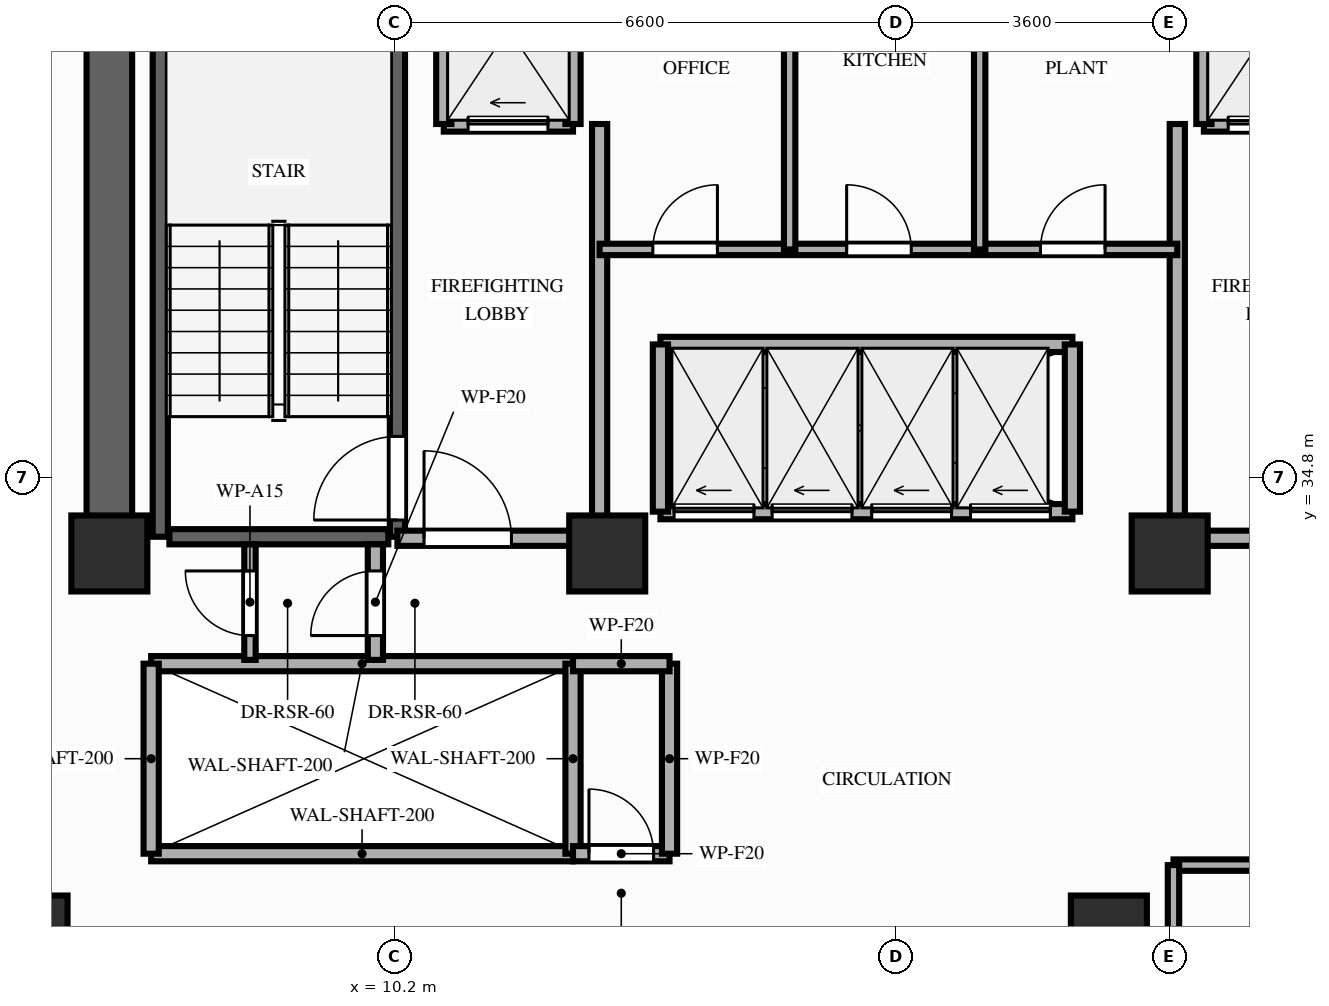
"""IFC4 building model, lengths in metres.
Left out: names, types, materials, properties, quantities, classifications, styles, units other than length and angle.
Written with IfcOpenShell. Run it as: python <this file> out.ifc"""

import sys

from ifc_helpers import new_model, si_unit, direction, frame, frame_2d, origin, origin_2d, place, context, subcontext, project, spatial, rectangle, extrude, element, fill, save


model = new_model("IFC4")
c1 = context("Model", 3, precision=1e-05, world=origin(), true_north=direction((0.0, 1.0)))
c2 = subcontext(c1, "Body", "Model", "MODEL_VIEW")
j1 = project(units=[si_unit("LENGTHUNIT", "METRE"), si_unit("PLANEANGLEUNIT", "RADIAN")], contexts=[c1])
p1 = place(None, origin())
s1 = spatial("IfcSite", under=j1, at=p1, CompositionType="ELEMENT")
p2 = place(p1, origin())
s2 = spatial("IfcBuilding", under=s1, at=p2, CompositionType="ELEMENT")
p3 = place(p2, frame((0.0, 0.0, 123.4)))
s3 = spatial("IfcBuildingStorey", under=s2, at=p3, CompositionType="ELEMENT", Elevation=123.4)
for number, where, z_axis, x_axis in (
    (1, (6.45, 33.8, 0.0), (0.0, 0.0, 1.0), (1.0, 0.0, 0.0)),
    (2, (13.0, 33.8, 0.0), (0.0, 0.0, 1.0), (1.0, 0.0, 0.0)),
    (3, (20.4, 33.8, 0.0), (0.0, 0.0, 1.0), (1.0, 0.0, 0.0)),
    (4, (5.4, 28.8, 0.0), (0.0, 0.0, 1.0), (1.0, 0.0, 0.0)),
    (5, (19.6, 28.8, 0.0), (0.0, 0.0, 1.0), (1.0, 0.0, 0.0)),
):
    element("IfcColumn", number, at=place(p3, frame(where, z_axis=z_axis, x_axis=x_axis)), inside=s3, PredefinedType="COLUMN", context=c2, shape_type="SweptSolid", body=[
        extrude(rectangle(XDim=1.0, YDim=1.0, at=origin_2d()), origin(), (0.0, 0.0, 1.0), 3.2),
    ])
p4 = place(p3, frame((6.45, 33.8, 0.0), z_axis=(0.0, 0.0, 1.0), x_axis=(0.0, 1.0, 0.0)))
e6 = element("IfcWall", 6, at=p4, inside=s3, PredefinedType="SHEAR", context=c2, shape_type="SweptSolid", body=[
    extrude(rectangle(XDim=7.95, YDim=0.6, at=frame_2d((3.975, 0.0))), origin(), (0.0, 0.0, 1.0), 3.02),
])
p5 = place(p3, frame((7.12, 34.02, 0.0), z_axis=(0.0, 0.0, 1.0), x_axis=(0.0, 1.0, 0.0)))
e7 = element("IfcWall", 7, at=p5, inside=s3, PredefinedType="SHEAR", context=c2, shape_type="SweptSolid", body=[
    extrude(rectangle(XDim=7.78, YDim=0.2, at=frame_2d((3.89, 0.0))), origin(), (0.0, 0.0, 1.0), 3.02),
])
p6 = place(p3, frame((10.24, 34.02, 0.0), z_axis=(0.0, 0.0, 1.0), x_axis=(0.0, 1.0, 0.0)))
e8 = element("IfcWall", 8, at=p6, inside=s3, PredefinedType="SHEAR", context=c2, shape_type="SweptSolid", body=[
    extrude(rectangle(XDim=7.78, YDim=0.2, at=frame_2d((3.89, 0.0))), origin(), (0.0, 0.0, 1.0), 3.02),
])
p7 = place(p6, frame((0.22, 0.0, 0.0)))
e9 = element("IfcOpeningElement", 9, at=p7, cuts=e8, PredefinedType="OPENING", context=c2, shape_type="SweptSolid", body=[
    extrude(rectangle(XDim=1.1, YDim=2.15, at=frame_2d((0.55, 1.075))), frame((0.0, 0.11, 0.0), z_axis=(0.0, -1.0, 0.0), x_axis=(1.0, 0.0, 0.0)), (0.0, 0.0, 1.0), 0.22),
])
p8 = place(p3, frame((7.24, 34.02, 0.0), z_axis=(0.0, 0.0, 1.0), x_axis=(1.0, 0.0, 0.0)))
e10 = element("IfcWall", 10, at=p8, inside=s3, PredefinedType="SHEAR", context=c2, shape_type="SweptSolid", body=[
    extrude(rectangle(XDim=2.88, YDim=0.2, at=frame_2d((1.44, 0.0))), origin(), (0.0, 0.0, 1.0), 3.02),
])
for number, where, z_axis, x_axis in (
    (11, (7.0, 29.85, 0.0), (0.0, 0.0, 1.0), (1.0, 0.0, 0.0)),
    (12, (7.0, 32.35, 0.0), (0.0, 0.0, 1.0), (1.0, 0.0, 0.0)),
):
    element("IfcWall", number, at=place(p3, frame(where, z_axis=z_axis, x_axis=x_axis)), inside=s3, PredefinedType="MOVABLE", context=c2, shape_type="SweptSolid", body=[
        extrude(rectangle(XDim=5.55, YDim=0.2, at=frame_2d((2.775, 0.0))), origin(), (0.0, 0.0, 1.0), 3.02),
    ])
for number, where, z_axis, x_axis in (
    (13, (7.0, 29.85, 0.0), (0.0, 0.0, 1.0), (0.0, 1.0, 0.0)),
    (14, (12.55, 29.85, 0.0), (0.0, 0.0, 1.0), (0.0, 1.0, 0.0)),
):
    element("IfcWall", number, at=place(p3, frame(where, z_axis=z_axis, x_axis=x_axis)), inside=s3, PredefinedType="MOVABLE", context=c2, shape_type="SweptSolid", body=[
        extrude(rectangle(XDim=2.5, YDim=0.2, at=frame_2d((1.25, 0.0))), origin(), (0.0, 0.0, 1.0), 3.02),
    ])
p9 = place(p3, frame((10.85, 39.45, 0.0), z_axis=(0.0, 0.0, 1.0), x_axis=(1.0, 0.0, 0.0)))
e15 = element("IfcWall", 15, at=p9, inside=s3, PredefinedType="MOVABLE", context=c2, shape_type="SweptSolid", body=[
    extrude(rectangle(XDim=1.7, YDim=0.2, at=frame_2d((0.85, 0.0))), origin(), (0.0, 0.0, 1.0), 3.02),
])
p10 = place(p9, frame((0.32, 0.0, 0.0)))
e16 = element("IfcOpeningElement", 16, at=p10, cuts=e15, PredefinedType="OPENING", context=c2, shape_type="SweptSolid", body=[
    extrude(rectangle(XDim=1.05, YDim=2.15, at=frame_2d((0.525, 1.075))), frame((0.0, 0.11, 0.0), z_axis=(0.0, -1.0, 0.0), x_axis=(1.0, 0.0, 0.0)), (0.0, 0.0, 1.0), 0.22),
])
p11 = place(p3, frame((20.85, 39.45, 0.0), z_axis=(0.0, 0.0, 1.0), x_axis=(1.0, 0.0, 0.0)))
e17 = element("IfcWall", 17, at=p11, inside=s3, PredefinedType="MOVABLE", context=c2, shape_type="SweptSolid", body=[
    extrude(rectangle(XDim=1.7, YDim=0.2, at=frame_2d((0.85, 0.0))), origin(), (0.0, 0.0, 1.0), 3.02),
])
p12 = place(p11, frame((0.32, 0.0, 0.0)))
e18 = element("IfcOpeningElement", 18, at=p12, cuts=e17, PredefinedType="OPENING", context=c2, shape_type="SweptSolid", body=[
    extrude(rectangle(XDim=1.05, YDim=2.15, at=frame_2d((0.525, 1.075))), frame((0.0, 0.11, 0.0), z_axis=(0.0, -1.0, 0.0), x_axis=(1.0, 0.0, 0.0)), (0.0, 0.0, 1.0), 0.22),
])
for number, where, z_axis, x_axis in (
    (19, (10.85, 39.45, 0.0), (0.0, 0.0, 1.0), (0.0, 1.0, 0.0)),
    (20, (12.55, 39.45, 0.0), (0.0, 0.0, 1.0), (0.0, 1.0, 0.0)),
):
    element("IfcWall", number, at=place(p3, frame(where, z_axis=z_axis, x_axis=x_axis)), inside=s3, PredefinedType="MOVABLE", context=c2, shape_type="SweptSolid", body=[
        extrude(rectangle(XDim=2.65, YDim=0.2, at=frame_2d((1.325, 0.0))), origin(), (0.0, 0.0, 1.0), 2.45),
    ])
p13 = place(p3, frame((12.9, 34.0, 0.0), z_axis=(0.0, 0.0, 1.0), x_axis=(0.0, 1.0, 0.0)))
e21 = element("IfcWall", 21, at=p13, inside=s3, PredefinedType="PARTITIONING", context=c2, shape_type="SweptSolid", body=[
    extrude(rectangle(XDim=5.45, YDim=0.2, at=frame_2d((2.725, 0.0))), origin(), (0.0, 0.0, 1.0), 2.45),
])
p14 = place(p3, frame((10.24, 34.0, 0.0), z_axis=(0.0, 0.0, 1.0), x_axis=(1.0, 0.0, 0.0)))
e22 = element("IfcWall", 22, at=p14, inside=s3, PredefinedType="PARTITIONING", context=c2, shape_type="SweptSolid", body=[
    extrude(rectangle(XDim=2.66, YDim=0.2, at=frame_2d((1.33, 0.0))), origin(), (0.0, 0.0, 1.0), 2.45),
])
p15 = place(p14, frame((0.35, 0.0, 0.0)))
e23 = element("IfcOpeningElement", 23, at=p15, cuts=e22, PredefinedType="OPENING", context=c2, shape_type="SweptSolid", body=[
    extrude(rectangle(XDim=1.15, YDim=2.15, at=frame_2d((0.575, 1.075))), frame((0.0, 0.11, 0.0), z_axis=(0.0, -1.0, 0.0), x_axis=(1.0, 0.0, 0.0)), (0.0, 0.0, 1.0), 0.22),
])
p16 = place(p3, frame((20.85, 39.45, 0.0), z_axis=(0.0, 0.0, 1.0), x_axis=(0.0, 1.0, 0.0)))
e24 = element("IfcWall", 24, at=p16, inside=s3, PredefinedType="MOVABLE", context=c2, shape_type="SweptSolid", body=[
    extrude(rectangle(XDim=2.65, YDim=0.2, at=frame_2d((1.325, 0.0))), origin(), (0.0, 0.0, 1.0), 2.45),
])
p17 = place(p3, frame((20.5, 34.0, 0.0), z_axis=(0.0, 0.0, 1.0), x_axis=(0.0, 1.0, 0.0)))
e25 = element("IfcWall", 25, at=p17, inside=s3, PredefinedType="PARTITIONING", context=c2, shape_type="SweptSolid", body=[
    extrude(rectangle(XDim=5.45, YDim=0.2, at=frame_2d((2.725, 0.0))), origin(), (0.0, 0.0, 1.0), 2.45),
])
p18 = place(p3, frame((20.5, 34.0, 0.0), z_axis=(0.0, 0.0, 1.0), x_axis=(1.0, 0.0, 0.0)))
e26 = element("IfcWall", 26, at=p18, inside=s3, PredefinedType="PARTITIONING", context=c2, shape_type="SweptSolid", body=[
    extrude(rectangle(XDim=2.6, YDim=0.2, at=frame_2d((1.3, 0.0))), origin(), (0.0, 0.0, 1.0), 2.45),
])
p19 = place(p18, frame((1.05, 0.0, 0.0)))
e27 = element("IfcOpeningElement", 27, at=p19, cuts=e26, PredefinedType="OPENING", context=c2, shape_type="SweptSolid", body=[
    extrude(rectangle(XDim=1.15, YDim=2.15, at=frame_2d((0.575, 1.075))), frame((0.0, 0.11, 0.0), z_axis=(0.0, -1.0, 0.0), x_axis=(1.0, 0.0, 0.0)), (0.0, 0.0, 1.0), 0.22),
])
p20 = place(p3, frame((9.95, 32.4, 0.0), z_axis=(0.0, 0.0, 1.0), x_axis=(0.0, 1.0, 0.0)))
e28 = element("IfcWall", 28, at=p20, inside=s3, PredefinedType="PARTITIONING", context=c2, shape_type="SweptSolid", body=[
    extrude(rectangle(XDim=1.52, YDim=0.2, at=frame_2d((0.76, 0.0))), origin(), (0.0, 0.0, 1.0), 2.45),
])
p21 = place(p20, frame((0.32, 0.0, 0.0)))
e29 = element("IfcOpeningElement", 29, at=p21, cuts=e28, PredefinedType="OPENING", context=c2, shape_type="SweptSolid", body=[
    extrude(rectangle(XDim=0.85, YDim=2.05, at=frame_2d((0.425, 1.025))), frame((0.0, 0.11, 0.0), z_axis=(0.0, -1.0, 0.0), x_axis=(1.0, 0.0, 0.0)), (0.0, 0.0, 1.0), 0.22),
])
p22 = place(p3, frame((8.3, 32.4, 0.0), z_axis=(0.0, 0.0, 1.0), x_axis=(0.0, 1.0, 0.0)))
e30 = element("IfcWall", 30, at=p22, inside=s3, PredefinedType="PARTITIONING", context=c2, shape_type="SweptSolid", body=[
    extrude(rectangle(XDim=1.52, YDim=0.15, at=frame_2d((0.76, 0.0))), origin(), (0.0, 0.0, 1.0), 2.45),
])
p23 = place(p22, frame((0.32, 0.0, 0.0)))
e31 = element("IfcOpeningElement", 31, at=p23, cuts=e30, PredefinedType="OPENING", context=c2, shape_type="SweptSolid", body=[
    extrude(rectangle(XDim=0.85, YDim=2.05, at=frame_2d((0.425, 1.025))), frame((0.0, 0.085, 0.0), z_axis=(0.0, -1.0, 0.0), x_axis=(1.0, 0.0, 0.0)), (0.0, 0.0, 1.0), 0.17),
])
p24 = place(p3, frame((12.55, 29.85, 0.0), z_axis=(0.0, 0.0, 1.0), x_axis=(1.0, 0.0, 0.0)))
e32 = element("IfcWall", 32, at=p24, inside=s3, PredefinedType="PARTITIONING", context=c2, shape_type="SweptSolid", body=[
    extrude(rectangle(XDim=1.27, YDim=0.2, at=frame_2d((0.635, 0.0))), origin(), (0.0, 0.0, 1.0), 3.02),
])
p25 = place(p24, frame((0.21, 0.0, 0.0)))
e33 = element("IfcOpeningElement", 33, at=p25, cuts=e32, PredefinedType="OPENING", context=c2, shape_type="SweptSolid", body=[
    extrude(rectangle(XDim=0.85, YDim=2.05, at=frame_2d((0.425, 1.025))), frame((0.0, 0.11, 0.0), z_axis=(0.0, -1.0, 0.0), x_axis=(1.0, 0.0, 0.0)), (0.0, 0.0, 1.0), 0.22),
])
p26 = place(p3, frame((13.82, 29.85, 0.0), z_axis=(0.0, 0.0, 1.0), x_axis=(0.0, 1.0, 0.0)))
e34 = element("IfcWall", 34, at=p26, inside=s3, PredefinedType="PARTITIONING", context=c2, shape_type="SweptSolid", body=[
    extrude(rectangle(XDim=2.5, YDim=0.2, at=frame_2d((1.25, 0.0))), origin(), (0.0, 0.0, 1.0), 3.02),
])
p27 = place(p3, frame((12.55, 32.35, 0.0), z_axis=(0.0, 0.0, 1.0), x_axis=(1.0, 0.0, 0.0)))
e35 = element("IfcWall", 35, at=p27, inside=s3, PredefinedType="PARTITIONING", context=c2, shape_type="SweptSolid", body=[
    extrude(rectangle(XDim=1.27, YDim=0.2, at=frame_2d((0.635, 0.0))), origin(), (0.0, 0.0, 1.0), 3.02),
])
p28 = place(p3, frame((12.9, 37.8, 0.0), z_axis=(0.0, 0.0, 1.0), x_axis=(1.0, 0.0, 0.0)))
e36 = element("IfcWall", 36, at=p28, inside=s3, PredefinedType="PARTITIONING", context=c2, shape_type="SweptSolid", body=[
    extrude(rectangle(XDim=7.6, YDim=0.15, at=frame_2d((3.8, 0.0))), origin(), (0.0, 0.0, 1.0), 3.02),
])
p29 = place(p28, frame((0.7, 0.0, 0.0)))
e37 = element("IfcOpeningElement", 37, at=p29, cuts=e36, PredefinedType="OPENING", context=c2, shape_type="SweptSolid", body=[
    extrude(rectangle(XDim=0.85, YDim=2.05, at=frame_2d((0.425, 1.025))), frame((0.0, 0.085, 0.0), z_axis=(0.0, -1.0, 0.0), x_axis=(1.0, 0.0, 0.0)), (0.0, 0.0, 1.0), 0.17),
])
p30 = place(p28, frame((3.25, 0.0, 0.0)))
e38 = element("IfcOpeningElement", 38, at=p30, cuts=e36, PredefinedType="OPENING", context=c2, shape_type="SweptSolid", body=[
    extrude(rectangle(XDim=0.85, YDim=2.05, at=frame_2d((0.425, 1.025))), frame((0.0, 0.085, 0.0), z_axis=(0.0, -1.0, 0.0), x_axis=(1.0, 0.0, 0.0)), (0.0, 0.0, 1.0), 0.17),
])
p31 = place(p28, frame((5.8, 0.0, 0.0)))
e39 = element("IfcOpeningElement", 39, at=p31, cuts=e36, PredefinedType="OPENING", context=c2, shape_type="SweptSolid", body=[
    extrude(rectangle(XDim=0.85, YDim=2.05, at=frame_2d((0.425, 1.025))), frame((0.0, 0.085, 0.0), z_axis=(0.0, -1.0, 0.0), x_axis=(1.0, 0.0, 0.0)), (0.0, 0.0, 1.0), 0.17),
])
for number, where, z_axis, x_axis in (
    (40, (15.4, 37.8, 0.0), (0.0, 0.0, 1.0), (0.0, 1.0, 0.0)),
    (41, (17.9, 37.8, 0.0), (0.0, 0.0, 1.0), (0.0, 1.0, 0.0)),
):
    element("IfcWall", number, at=place(p3, frame(where, z_axis=z_axis, x_axis=x_axis)), inside=s3, PredefinedType="PARTITIONING", context=c2, shape_type="SweptSolid", body=[
        extrude(rectangle(XDim=4.4, YDim=0.15, at=frame_2d((2.2, 0.0))), origin(), (0.0, 0.0, 1.0), 2.45),
    ])
p32 = place(p3, frame((13.7, 34.35, 0.0), z_axis=(0.0, 0.0, 1.0), x_axis=(1.0, 0.0, 0.0)))
e42 = element("IfcWall", 42, at=p32, inside=s3, PredefinedType="MOVABLE", context=c2, shape_type="SweptSolid", body=[
    extrude(rectangle(XDim=5.42, YDim=0.2, at=frame_2d((2.71, 0.0))), origin(), (0.0, 0.0, 1.0), 3.02),
])
p33 = place(p32, frame((0.18, 0.0, 0.0)))
e43 = element("IfcOpeningElement", 43, at=p33, cuts=e42, PredefinedType="OPENING", context=c2, shape_type="SweptSolid", body=[
    extrude(rectangle(XDim=1.05, YDim=2.15, at=frame_2d((0.525, 1.075))), frame((0.0, 0.11, 0.0), z_axis=(0.0, -1.0, 0.0), x_axis=(1.0, 0.0, 0.0)), (0.0, 0.0, 1.0), 0.22),
])
p34 = place(p32, frame((1.47, 0.0, 0.0)))
e44 = element("IfcOpeningElement", 44, at=p34, cuts=e42, PredefinedType="OPENING", context=c2, shape_type="SweptSolid", body=[
    extrude(rectangle(XDim=1.05, YDim=2.15, at=frame_2d((0.525, 1.075))), frame((0.0, 0.11, 0.0), z_axis=(0.0, -1.0, 0.0), x_axis=(1.0, 0.0, 0.0)), (0.0, 0.0, 1.0), 0.22),
])
p35 = place(p32, frame((2.78, 0.0, 0.0)))
e45 = element("IfcOpeningElement", 45, at=p35, cuts=e42, PredefinedType="OPENING", context=c2, shape_type="SweptSolid", body=[
    extrude(rectangle(XDim=1.05, YDim=2.15, at=frame_2d((0.525, 1.075))), frame((0.0, 0.11, 0.0), z_axis=(0.0, -1.0, 0.0), x_axis=(1.0, 0.0, 0.0)), (0.0, 0.0, 1.0), 0.22),
])
p36 = place(p32, frame((4.08, 0.0, 0.0)))
e46 = element("IfcOpeningElement", 46, at=p36, cuts=e42, PredefinedType="OPENING", context=c2, shape_type="SweptSolid", body=[
    extrude(rectangle(XDim=1.05, YDim=2.15, at=frame_2d((0.525, 1.075))), frame((0.0, 0.11, 0.0), z_axis=(0.0, -1.0, 0.0), x_axis=(1.0, 0.0, 0.0)), (0.0, 0.0, 1.0), 0.22),
])
p37 = place(p3, frame((13.7, 36.55, 0.0), z_axis=(0.0, 0.0, 1.0), x_axis=(1.0, 0.0, 0.0)))
e47 = element("IfcWall", 47, at=p37, inside=s3, PredefinedType="MOVABLE", context=c2, shape_type="SweptSolid", body=[
    extrude(rectangle(XDim=5.42, YDim=0.2, at=frame_2d((2.71, 0.0))), origin(), (0.0, 0.0, 1.0), 3.02),
])
for number, where, z_axis, x_axis in (
    (48, (13.7, 34.35, 0.0), (0.0, 0.0, 1.0), (0.0, 1.0, 0.0)),
    (49, (19.12, 34.35, 0.0), (0.0, 0.0, 1.0), (0.0, 1.0, 0.0)),
):
    element("IfcWall", number, at=place(p3, frame(where, z_axis=z_axis, x_axis=x_axis)), inside=s3, PredefinedType="MOVABLE", context=c2, shape_type="SweptSolid", body=[
        extrude(rectangle(XDim=2.2, YDim=0.2, at=frame_2d((1.1, 0.0))), origin(), (0.0, 0.0, 1.0), 3.02),
    ])
p38 = place(p3, frame((20.45, 29.7, 0.0), z_axis=(0.0, 0.0, 1.0), x_axis=(1.0, 0.0, 0.0)))
e50 = element("IfcWall", 50, at=p38, inside=s3, PredefinedType="PARTITIONING", context=c2, shape_type="SweptSolid", body=[
    extrude(rectangle(XDim=6.7, YDim=0.15, at=frame_2d((3.35, 0.0))), origin(), (0.0, 0.0, 1.0), 3.02),
])
p39 = place(p38, frame((2.8, 0.0, 0.0)))
e51 = element("IfcOpeningElement", 51, at=p39, cuts=e50, PredefinedType="OPENING", context=c2, shape_type="SweptSolid", body=[
    extrude(rectangle(XDim=0.95, YDim=2.15, at=frame_2d((0.475, 1.075))), frame((0.0, 0.085, 0.0), z_axis=(0.0, -1.0, 0.0), x_axis=(1.0, 0.0, 0.0)), (0.0, 0.0, 1.0), 0.17),
])
p40 = place(p3, frame((20.45, 26.75, 0.0), z_axis=(0.0, 0.0, 1.0), x_axis=(0.0, 1.0, 0.0)))
e52 = element("IfcWall", 52, at=p40, inside=s3, PredefinedType="PARTITIONING", context=c2, shape_type="SweptSolid", body=[
    extrude(rectangle(XDim=2.95, YDim=0.15, at=frame_2d((1.475, 0.0))), origin(), (0.0, 0.0, 1.0), 2.45),
])
p41 = place(p7, origin())
e53 = element("IfcDoor", 53, at=p41, inside=s3, OperationType="SINGLE_SWING_LEFT", PredefinedType="DOOR", context=c2, shape_type="SweptSolid", body=[
    extrude(rectangle(XDim=1.1, YDim=2.15, at=frame_2d((0.55, 1.075))), frame((0.0, 0.025, 0.0), z_axis=(0.0, -1.0, 0.0), x_axis=(1.0, 0.0, 0.0)), (0.0, 0.0, 1.0), 0.05),
])
fill(e9, e53)
p42 = place(p10, origin())
e54 = element("IfcDoor", 54, at=p42, inside=s3, OperationType="SLIDING_TO_LEFT", PredefinedType="DOOR", context=c2, shape_type="SweptSolid", body=[
    extrude(rectangle(XDim=1.05, YDim=2.15, at=frame_2d((0.525, 1.075))), frame((0.0, 0.025, 0.0), z_axis=(0.0, -1.0, 0.0), x_axis=(1.0, 0.0, 0.0)), (0.0, 0.0, 1.0), 0.05),
])
fill(e16, e54)
p43 = place(p12, origin())
e55 = element("IfcDoor", 55, at=p43, inside=s3, OperationType="SLIDING_TO_LEFT", PredefinedType="DOOR", context=c2, shape_type="SweptSolid", body=[
    extrude(rectangle(XDim=1.05, YDim=2.15, at=frame_2d((0.525, 1.075))), frame((0.0, 0.025, 0.0), z_axis=(0.0, -1.0, 0.0), x_axis=(1.0, 0.0, 0.0)), (0.0, 0.0, 1.0), 0.05),
])
fill(e18, e55)
p44 = place(p15, origin())
e56 = element("IfcDoor", 56, at=p44, inside=s3, OperationType="SINGLE_SWING_LEFT", PredefinedType="DOOR", context=c2, shape_type="SweptSolid", body=[
    extrude(rectangle(XDim=1.15, YDim=2.15, at=frame_2d((0.575, 1.075))), frame((0.0, 0.025, 0.0), z_axis=(0.0, -1.0, 0.0), x_axis=(1.0, 0.0, 0.0)), (0.0, 0.0, 1.0), 0.05),
])
fill(e23, e56)
p45 = place(p21, origin())
e57 = element("IfcDoor", 57, at=p45, inside=s3, OperationType="SINGLE_SWING_LEFT", PredefinedType="DOOR", context=c2, shape_type="SweptSolid", body=[
    extrude(rectangle(XDim=0.85, YDim=2.05, at=frame_2d((0.425, 1.025))), frame((0.0, 0.025, 0.0), z_axis=(0.0, -1.0, 0.0), x_axis=(1.0, 0.0, 0.0)), (0.0, 0.0, 1.0), 0.05),
])
fill(e29, e57)
p46 = place(p23, origin())
e58 = element("IfcDoor", 58, at=p46, inside=s3, OperationType="SINGLE_SWING_RIGHT", PredefinedType="DOOR", context=c2, shape_type="SweptSolid", body=[
    extrude(rectangle(XDim=0.85, YDim=2.05, at=frame_2d((0.425, 1.025))), frame((0.0, 0.025, 0.0), z_axis=(0.0, -1.0, 0.0), x_axis=(1.0, 0.0, 0.0)), (0.0, 0.0, 1.0), 0.05),
])
fill(e31, e58)
p47 = place(p25, origin())
e59 = element("IfcDoor", 59, at=p47, inside=s3, OperationType="SINGLE_SWING_LEFT", PredefinedType="DOOR", context=c2, shape_type="SweptSolid", body=[
    extrude(rectangle(XDim=0.85, YDim=2.05, at=frame_2d((0.425, 1.025))), frame((0.0, 0.025, 0.0), z_axis=(0.0, -1.0, 0.0), x_axis=(1.0, 0.0, 0.0)), (0.0, 0.0, 1.0), 0.05),
])
fill(e33, e59)
p48 = place(p29, origin())
e60 = element("IfcDoor", 60, at=p48, inside=s3, OperationType="SINGLE_SWING_RIGHT", PredefinedType="DOOR", context=c2, shape_type="SweptSolid", body=[
    extrude(rectangle(XDim=0.85, YDim=2.05, at=frame_2d((0.425, 1.025))), frame((0.0, 0.025, 0.0), z_axis=(0.0, -1.0, 0.0), x_axis=(1.0, 0.0, 0.0)), (0.0, 0.0, 1.0), 0.05),
])
fill(e37, e60)
p49 = place(p30, origin())
e61 = element("IfcDoor", 61, at=p49, inside=s3, OperationType="SINGLE_SWING_LEFT", PredefinedType="DOOR", context=c2, shape_type="SweptSolid", body=[
    extrude(rectangle(XDim=0.85, YDim=2.05, at=frame_2d((0.425, 1.025))), frame((0.0, 0.025, 0.0), z_axis=(0.0, -1.0, 0.0), x_axis=(1.0, 0.0, 0.0)), (0.0, 0.0, 1.0), 0.05),
])
fill(e38, e61)
p50 = place(p31, origin())
e62 = element("IfcDoor", 62, at=p50, inside=s3, OperationType="SINGLE_SWING_RIGHT", PredefinedType="DOOR", context=c2, shape_type="SweptSolid", body=[
    extrude(rectangle(XDim=0.85, YDim=2.05, at=frame_2d((0.425, 1.025))), frame((0.0, 0.025, 0.0), z_axis=(0.0, -1.0, 0.0), x_axis=(1.0, 0.0, 0.0)), (0.0, 0.0, 1.0), 0.05),
])
fill(e39, e62)
p51 = place(p33, origin())
e63 = element("IfcDoor", 63, at=p51, inside=s3, OperationType="SLIDING_TO_LEFT", PredefinedType="DOOR", context=c2, shape_type="SweptSolid", body=[
    extrude(rectangle(XDim=1.05, YDim=2.15, at=frame_2d((0.525, 1.075))), frame((0.0, 0.025, 0.0), z_axis=(0.0, -1.0, 0.0), x_axis=(1.0, 0.0, 0.0)), (0.0, 0.0, 1.0), 0.05),
])
fill(e43, e63)
p52 = place(p34, origin())
e64 = element("IfcDoor", 64, at=p52, inside=s3, OperationType="SLIDING_TO_LEFT", PredefinedType="DOOR", context=c2, shape_type="SweptSolid", body=[
    extrude(rectangle(XDim=1.05, YDim=2.15, at=frame_2d((0.525, 1.075))), frame((0.0, 0.025, 0.0), z_axis=(0.0, -1.0, 0.0), x_axis=(1.0, 0.0, 0.0)), (0.0, 0.0, 1.0), 0.05),
])
fill(e44, e64)
p53 = place(p35, origin())
e65 = element("IfcDoor", 65, at=p53, inside=s3, OperationType="SLIDING_TO_LEFT", PredefinedType="DOOR", context=c2, shape_type="SweptSolid", body=[
    extrude(rectangle(XDim=1.05, YDim=2.15, at=frame_2d((0.525, 1.075))), frame((0.0, 0.025, 0.0), z_axis=(0.0, -1.0, 0.0), x_axis=(1.0, 0.0, 0.0)), (0.0, 0.0, 1.0), 0.05),
])
fill(e45, e65)
p54 = place(p36, origin())
e66 = element("IfcDoor", 66, at=p54, inside=s3, OperationType="SLIDING_TO_LEFT", PredefinedType="DOOR", context=c2, shape_type="SweptSolid", body=[
    extrude(rectangle(XDim=1.05, YDim=2.15, at=frame_2d((0.525, 1.075))), frame((0.0, 0.025, 0.0), z_axis=(0.0, -1.0, 0.0), x_axis=(1.0, 0.0, 0.0)), (0.0, 0.0, 1.0), 0.05),
])
fill(e46, e66)
save(model, sys.argv[1])
